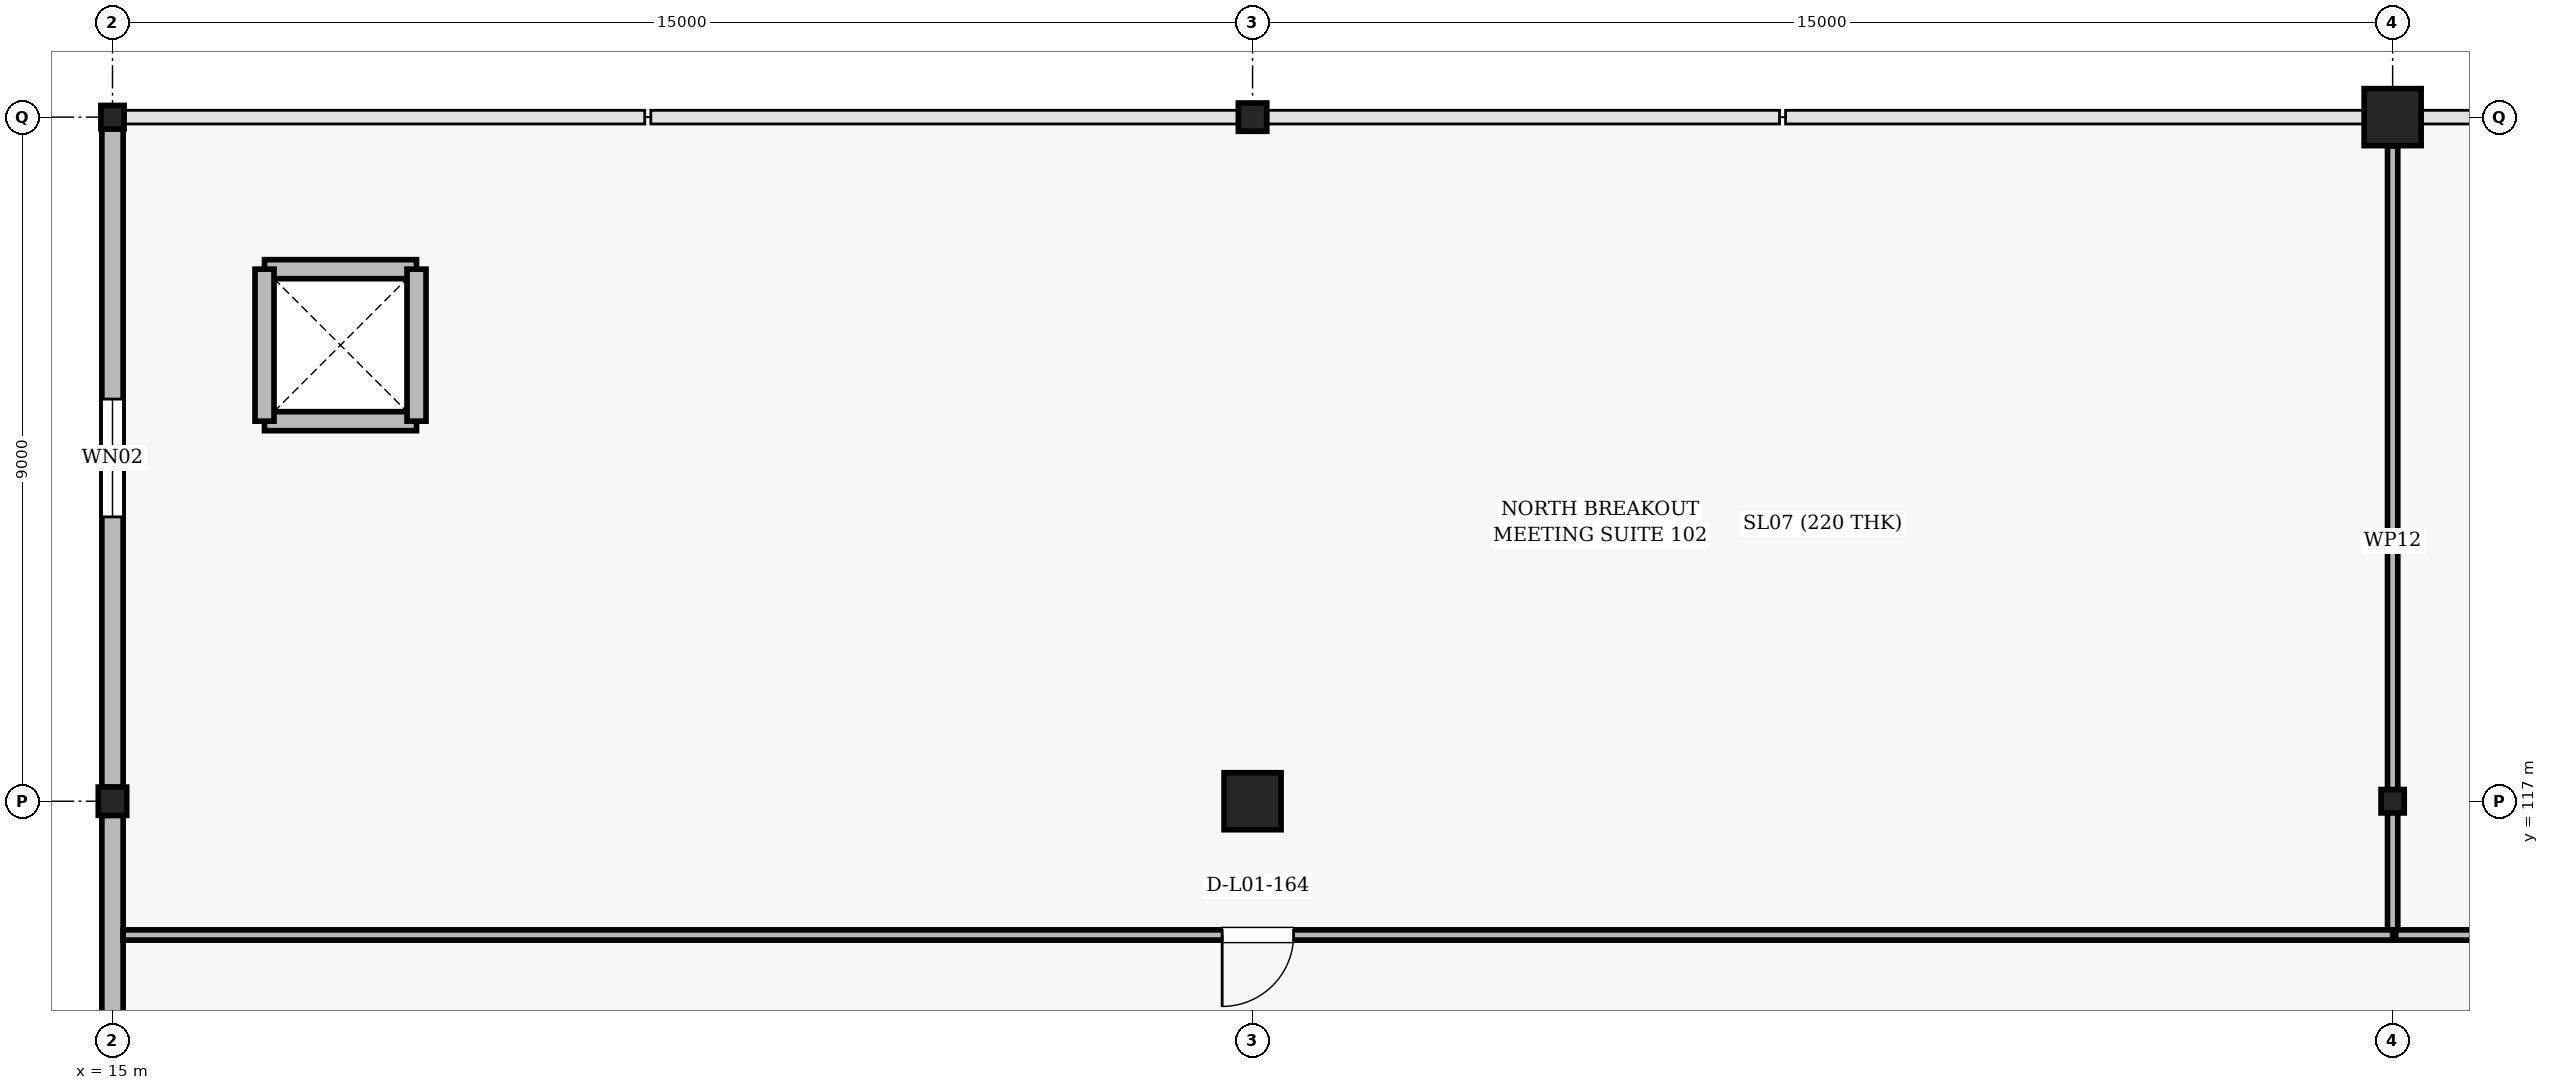
"""IFC4 building model, lengths in metres.
Left out: names, types, materials, properties, quantities, classifications, styles, units other than length and angle.
Written with IfcOpenShell. Run it as: python <this file> out.ifc"""

import sys

from ifc_helpers import new_model, si_unit, direction, frame, frame_2d, origin, origin_2d, place, context, subcontext, project, spatial, rectangle, i_section, extrude, element, fill, save


model = new_model("IFC4")
c1 = context("Model", 3, precision=1e-05, world=origin(), true_north=direction((0.0, 1.0)))
c2 = subcontext(c1, "Body", "Model", "MODEL_VIEW")
j1 = project(units=[si_unit("LENGTHUNIT", "METRE"), si_unit("PLANEANGLEUNIT", "RADIAN")], contexts=[c1])
p1 = place(None, origin())
s1 = spatial("IfcSite", under=j1, at=p1, CompositionType="ELEMENT")
p2 = place(p1, origin())
s2 = spatial("IfcBuilding", under=s1, at=p2, CompositionType="ELEMENT")
p3 = place(p2, frame((0.0, 0.0, 5.4)))
s3 = spatial("IfcBuildingStorey", under=s2, at=p3, CompositionType="ELEMENT", Elevation=5.4)
p4 = place(p3, frame((15.0, 117.0, 0.0), z_axis=(0.0, 0.0, 1.0), x_axis=(1.0, 0.0, 0.0)))
e1 = element("IfcColumn", 1, at=p4, inside=s3, PredefinedType="COLUMN", context=c2, shape_type="SweptSolid", body=[
    extrude(i_section(OverallWidth=0.374, OverallDepth=0.372, WebThickness=0.016, FlangeThickness=0.026, FilletRadius=0.016, at=origin_2d()), origin(), (0.0, 0.0, 1.0), 5.205),
])
p5 = place(p3, frame((15.0, 126.0, 0.0), z_axis=(0.0, 0.0, 1.0), x_axis=(1.0, 0.0, 0.0)))
e2 = element("IfcColumn", 2, at=p5, inside=s3, PredefinedType="COLUMN", context=c2, shape_type="SweptSolid", body=[
    extrude(i_section(OverallWidth=0.305, OverallDepth=0.308, WebThickness=0.01, FlangeThickness=0.015, FilletRadius=0.015, at=origin_2d()), origin(), (0.0, 0.0, 1.0), 5.205),
])
p6 = place(p3, frame((30.0, 117.0, 0.0), z_axis=(0.0, 0.0, 1.0), x_axis=(1.0, 0.0, 0.0)))
e3 = element("IfcColumn", 3, at=p6, inside=s3, PredefinedType="COLUMN", context=c2, shape_type="SweptSolid", body=[
    extrude(rectangle(XDim=0.75, YDim=0.75, at=origin_2d()), origin(), (0.0, 0.0, 1.0), 5.205),
])
p7 = place(p3, frame((30.0, 126.0, 0.0), z_axis=(0.0, 0.0, 1.0), x_axis=(1.0, 0.0, 0.0)))
e4 = element("IfcColumn", 4, at=p7, inside=s3, PredefinedType="COLUMN", context=c2, shape_type="SweptSolid", body=[
    extrude(i_section(OverallWidth=0.374, OverallDepth=0.372, WebThickness=0.016, FlangeThickness=0.026, FilletRadius=0.016, at=origin_2d()), origin(), (0.0, 0.0, 1.0), 5.205),
])
p8 = place(p3, frame((45.0, 117.0, 0.0), z_axis=(0.0, 0.0, 1.0), x_axis=(1.0, 0.0, 0.0)))
e5 = element("IfcColumn", 5, at=p8, inside=s3, PredefinedType="COLUMN", context=c2, shape_type="SweptSolid", body=[
    extrude(i_section(OverallWidth=0.305, OverallDepth=0.308, WebThickness=0.01, FlangeThickness=0.015, FilletRadius=0.015, at=origin_2d()), origin(), (0.0, 0.0, 1.0), 5.205),
])
p9 = place(p3, frame((45.0, 126.0, 0.0), z_axis=(0.0, 0.0, 1.0), x_axis=(1.0, 0.0, 0.0)))
e6 = element("IfcColumn", 6, at=p9, inside=s3, PredefinedType="COLUMN", context=c2, shape_type="SweptSolid", body=[
    extrude(rectangle(XDim=0.75, YDim=0.75, at=origin_2d()), origin(), (0.0, 0.0, 1.0), 5.205),
])
p10 = place(p3, frame((15.0, 108.375, 0.0), z_axis=(0.0, 0.0, 1.0), x_axis=(0.0, 1.0, 0.0)))
e7 = element("IfcWall", 7, at=p10, inside=s3, PredefinedType="SOLIDWALL", context=c2, shape_type="SweptSolid", body=[
    extrude(rectangle(XDim=8.439, YDim=0.28, at=frame_2d((4.219, 0.0))), origin(), (0.0, 0.0, 1.0), 4.417),
])
p11 = place(p10, frame((3.52, 0.0, 0.95)))
e8 = element("IfcOpeningElement", 8, at=p11, cuts=e7, PredefinedType="OPENING", context=c2, shape_type="SweptSolid", body=[
    extrude(rectangle(XDim=1.4, YDim=1.7, at=frame_2d((0.7, 0.85))), frame((0.0, 0.15, 0.0), z_axis=(0.0, -1.0, 0.0), x_axis=(1.0, 0.0, 0.0)), (0.0, 0.0, 1.0), 0.3),
])
p12 = place(p3, frame((15.0, 117.186, 0.0), z_axis=(0.0, 0.0, 1.0), x_axis=(0.0, 1.0, 0.0)))
e9 = element("IfcWall", 9, at=p12, inside=s3, PredefinedType="SOLIDWALL", context=c2, shape_type="SweptSolid", body=[
    extrude(rectangle(XDim=8.66, YDim=0.28, at=frame_2d((4.33, 0.0))), origin(), (0.0, 0.0, 1.0), 4.495),
])
p13 = place(p12, frame((3.555, 0.0, 0.95)))
e10 = element("IfcOpeningElement", 10, at=p13, cuts=e9, PredefinedType="OPENING", context=c2, shape_type="SweptSolid", body=[
    extrude(rectangle(XDim=1.55, YDim=1.75, at=frame_2d((0.775, 0.875))), frame((0.0, 0.15, 0.0), z_axis=(0.0, -1.0, 0.0), x_axis=(1.0, 0.0, 0.0)), (0.0, 0.0, 1.0), 0.3),
])
p14 = place(p3, frame((45.0, 125.62, 0.0), z_axis=(0.0, 0.0, 1.0), x_axis=(0.0, -1.0, 0.0)))
e11 = element("IfcWall", 11, at=p14, inside=s3, PredefinedType="PARTITIONING", context=c2, shape_type="SweptSolid", body=[
    extrude(rectangle(XDim=10.38, YDim=0.135, at=frame_2d((5.19, 0.0))), origin(), (0.0, 0.0, 1.0), 4.417),
])
p15 = place(p3, frame((45.0, 115.24, 0.0), z_axis=(0.0, 0.0, 1.0), x_axis=(-1.0, 0.0, 0.0)))
e12 = element("IfcWall", 12, at=p15, inside=s3, PredefinedType="PARTITIONING", context=c2, shape_type="SweptSolid", body=[
    extrude(rectangle(XDim=29.86, YDim=0.135, at=frame_2d((14.93, 0.0))), origin(), (0.0, 0.0, 1.0), 4.417),
])
p16 = place(p15, frame((14.46, 0.0, 0.0)))
e13 = element("IfcOpeningElement", 13, at=p16, cuts=e12, PredefinedType="OPENING", context=c2, shape_type="SweptSolid", body=[
    extrude(rectangle(XDim=0.94, YDim=2.15, at=frame_2d((0.47, 1.075))), frame((0.0, 0.078, 0.0), z_axis=(0.0, -1.0, 0.0), x_axis=(1.0, 0.0, 0.0)), (0.0, 0.0, 1.0), 0.155),
])
p17 = place(p3, frame((77.35, 115.24, 0.0), z_axis=(0.0, 0.0, 1.0), x_axis=(-1.0, 0.0, 0.0)))
e14 = element("IfcWall", 14, at=p17, inside=s3, PredefinedType="PARTITIONING", context=c2, shape_type="SweptSolid", body=[
    extrude(rectangle(XDim=32.31, YDim=0.135, at=frame_2d((16.155, 0.0))), origin(), (0.0, 0.0, 1.0), 4.417),
])
p18 = place(p17, frame((15.665, 0.0, 0.0)))
e15 = element("IfcOpeningElement", 15, at=p18, cuts=e14, PredefinedType="OPENING", context=c2, shape_type="SweptSolid", body=[
    extrude(rectangle(XDim=0.98, YDim=2.15, at=frame_2d((0.49, 1.075))), frame((0.0, 0.078, 0.0), z_axis=(0.0, -1.0, 0.0), x_axis=(1.0, 0.0, 0.0)), (0.0, 0.0, 1.0), 0.155),
])
for number, where, z_axis, x_axis in (
    (16, (17.0, 122.0, 0.0), (0.0, 0.0, 1.0), (1.0, 0.0, 0.0)),
    (17, (19.0, 124.0, 0.0), (0.0, 0.0, 1.0), (-1.0, 0.0, 0.0)),
    (18, (17.0, 124.0, 0.0), (0.0, 0.0, 1.0), (0.0, -1.0, 0.0)),
    (19, (19.0, 122.0, 0.0), (0.0, 0.0, 1.0), (0.0, 1.0, 0.0)),
):
    element("IfcWall", number, at=place(p3, frame(where, z_axis=z_axis, x_axis=x_axis)), inside=s3, PredefinedType="SOLIDWALL", context=c2, shape_type="SweptSolid", body=[
        extrude(rectangle(XDim=2.0, YDim=0.25, at=frame_2d((1.0, 0.0))), origin(), (0.0, 0.0, 1.0), 4.81),
    ])
p19 = place(p13, origin())
e20 = element("IfcWindow", 20, at=p19, inside=s3, PartitioningType="SINGLE_PANEL", PredefinedType="WINDOW", context=c2, shape_type="SweptSolid", body=[
    extrude(rectangle(XDim=1.55, YDim=1.75, at=frame_2d((0.775, 0.875))), frame((0.0, 0.03, 0.0), z_axis=(0.0, -1.0, 0.0), x_axis=(1.0, 0.0, 0.0)), (0.0, 0.0, 1.0), 0.06),
])
fill(e10, e20)
p20 = place(p16, origin())
e21 = element("IfcDoor", 21, at=p20, inside=s3, OperationType="SINGLE_SWING_RIGHT", PredefinedType="DOOR", context=c2, shape_type="SweptSolid", body=[
    extrude(rectangle(XDim=0.94, YDim=2.15, at=frame_2d((0.47, 1.075))), frame((0.0, 0.025, 0.0), z_axis=(0.0, -1.0, 0.0), x_axis=(1.0, 0.0, 0.0)), (0.0, 0.0, 1.0), 0.05),
])
fill(e13, e21)
save(model, sys.argv[1])
